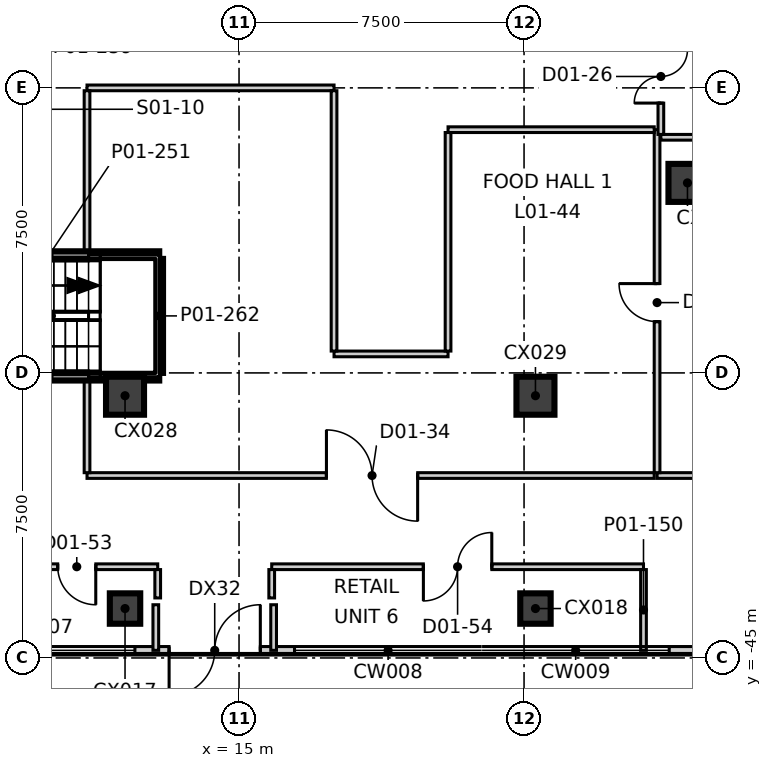
"""IFC4 building model, lengths in metres.
Left out: names, types, materials, properties, quantities, classifications, styles, units other than length and angle.
Written with IfcOpenShell. Run it as: python <this file> out.ifc"""

import sys

from ifc_helpers import new_model, si_unit, direction, frame, frame_2d, origin, origin_2d, place, context, subcontext, project, spatial, rectangle, extrude, element, fill, save


model = new_model("IFC4")
c1 = context("Model", 3, precision=1e-05, world=origin(), true_north=direction((0.0, 1.0)))
c2 = subcontext(c1, "Body", "Model", "MODEL_VIEW")
j1 = project(units=[si_unit("LENGTHUNIT", "METRE"), si_unit("PLANEANGLEUNIT", "RADIAN")], contexts=[c1])
p1 = place(None, origin())
s1 = spatial("IfcSite", under=j1, at=p1, CompositionType="ELEMENT")
p2 = place(p1, origin())
s2 = spatial("IfcBuilding", under=s1, at=p2, CompositionType="ELEMENT")
p3 = place(p2, frame((0.0, 0.0, 8.5)))
s3 = spatial("IfcBuildingStorey", under=s2, at=p3, CompositionType="ELEMENT", Elevation=8.5)
for number, where, z_axis, x_axis in (
    (1, (12.0, -43.7, -0.4), (0.0, 0.0, 1.0), (1.0, 0.0, 0.0)),
    (2, (22.8, -43.7, -0.4), (0.0, 0.0, 1.0), (1.0, 0.0, 0.0)),
):
    element("IfcColumn", number, at=place(p3, frame(where, z_axis=z_axis, x_axis=x_axis)), inside=s3, PredefinedType="COLUMN", context=c2, shape_type="SweptSolid", body=[
        extrude(rectangle(XDim=0.8, YDim=0.8, at=origin_2d()), origin(), (0.0, 0.0, 1.0), 6.0),
    ])
for number, where, z_axis, x_axis in (
    (3, (12.0, -38.1, -0.4), (0.0, 0.0, 1.0), (1.0, 0.0, 0.0)),
    (4, (22.8, -38.1, -0.4), (0.0, 0.0, 1.0), (1.0, 0.0, 0.0)),
    (5, (26.8, -32.5, -0.4), (0.0, 0.0, 1.0), (1.0, 0.0, 0.0)),
):
    element("IfcColumn", number, at=place(p3, frame(where, z_axis=z_axis, x_axis=x_axis)), inside=s3, PredefinedType="COLUMN", context=c2, shape_type="SweptSolid", body=[
        extrude(rectangle(XDim=1.0, YDim=1.0, at=origin_2d()), origin(), (0.0, 0.0, 1.0), 6.0),
    ])
p4 = place(p3, frame((12.26, -44.8, 0.0), z_axis=(0.0, 0.0, 1.0), x_axis=(1.0, 0.0, 0.0)))
e6 = element("IfcWall", 6, at=p4, inside=s3, PredefinedType="ELEMENTEDWALL", context=c2, shape_type="SweptSolid", body=[
    extrude(rectangle(XDim=4.2, YDim=0.2, at=frame_2d((2.1, 0.0))), origin(), (0.0, 0.0, 1.0), 5.6),
])
p5 = place(p4, frame((0.9, 0.0, 0.0)))
e7 = element("IfcOpeningElement", 7, at=p5, cuts=e6, PredefinedType="OPENING", context=c2, shape_type="SweptSolid", body=[
    extrude(rectangle(XDim=2.4, YDim=2.4, at=frame_2d((1.2, 1.2))), frame((0.0, 0.11, 0.0), z_axis=(0.0, -1.0, 0.0), x_axis=(1.0, 0.0, 0.0)), (0.0, 0.0, 1.0), 0.22),
])
p6 = place(p3, frame((26.32, -44.8, 0.0), z_axis=(0.0, 0.0, 1.0), x_axis=(1.0, 0.0, 0.0)))
e8 = element("IfcWall", 8, at=p6, inside=s3, PredefinedType="ELEMENTEDWALL", context=c2, shape_type="SweptSolid", body=[
    extrude(rectangle(XDim=4.2, YDim=0.2, at=frame_2d((2.1, 0.0))), origin(), (0.0, 0.0, 1.0), 5.6),
])
p7 = place(p6, frame((0.9, 0.0, 0.0)))
e9 = element("IfcOpeningElement", 9, at=p7, cuts=e8, PredefinedType="OPENING", context=c2, shape_type="SweptSolid", body=[
    extrude(rectangle(XDim=2.4, YDim=2.4, at=frame_2d((1.2, 1.2))), frame((0.0, 0.11, 0.0), z_axis=(0.0, -1.0, 0.0), x_axis=(1.0, 0.0, 0.0)), (0.0, 0.0, 1.0), 0.22),
])
p8 = place(p3, frame((26.1, -31.3, 0.0), z_axis=(0.0, 0.0, 1.0), x_axis=(1.0, 0.0, 0.0)))
e10 = element("IfcWall", 10, at=p8, inside=s3, PredefinedType="PARTITIONING", context=c2, shape_type="SweptSolid", body=[
    extrude(rectangle(XDim=1.9, YDim=0.15, at=frame_2d((0.95, 0.0))), origin(), (0.0, 0.0, 1.0), 5.6),
])
p9 = place(p3, frame((26.0, -40.2, 0.0), z_axis=(0.0, 0.0, 1.0), x_axis=(1.0, 0.0, 0.0)))
e11 = element("IfcWall", 11, at=p9, inside=s3, PredefinedType="PARTITIONING", context=c2, shape_type="SweptSolid", body=[
    extrude(rectangle(XDim=5.225, YDim=0.15, at=frame_2d((2.613, 0.0))), origin(), (0.0, 0.0, 1.0), 5.6),
])
p10 = place(p3, frame((26.0, -40.125, 0.0), z_axis=(0.0, 0.0, 1.0), x_axis=(0.0, 1.0, 0.0)))
e12 = element("IfcWall", 12, at=p10, inside=s3, PredefinedType="PARTITIONING", context=c2, shape_type="SweptSolid", body=[
    extrude(rectangle(XDim=9.025, YDim=0.15, at=frame_2d((4.512, 0.0))), origin(), (0.0, 0.0, 1.0), 5.6),
])
p11 = place(p10, frame((3.975, 0.0, 0.0)))
e13 = element("IfcOpeningElement", 13, at=p11, cuts=e12, PredefinedType="OPENING", context=c2, shape_type="SweptSolid", body=[
    extrude(rectangle(XDim=1.0, YDim=2.1, at=frame_2d((0.5, 1.05))), frame((0.0, 0.085, 0.0), z_axis=(0.0, -1.0, 0.0), x_axis=(1.0, 0.0, 0.0)), (0.0, 0.0, 1.0), 0.17),
])
p12 = place(p3, frame((26.1, -31.225, 0.0), z_axis=(0.0, 0.0, 1.0), x_axis=(0.0, 1.0, 0.0)))
e14 = element("IfcWall", 14, at=p12, inside=s3, PredefinedType="PARTITIONING", context=c2, shape_type="SweptSolid", body=[
    extrude(rectangle(XDim=3.05, YDim=0.15, at=frame_2d((1.525, 0.0))), origin(), (0.0, 0.0, 1.0), 5.6),
])
p13 = place(p12, frame((0.825, 0.0, 0.0)))
e15 = element("IfcOpeningElement", 15, at=p13, cuts=e14, PredefinedType="OPENING", context=c2, shape_type="SweptSolid", body=[
    extrude(rectangle(XDim=1.4, YDim=2.1, at=frame_2d((0.7, 1.05))), frame((0.0, 0.085, 0.0), z_axis=(0.0, -1.0, 0.0), x_axis=(1.0, 0.0, 0.0)), (0.0, 0.0, 1.0), 0.17),
])
p14 = place(p3, frame((8.6, -42.6, 0.0), z_axis=(0.0, 0.0, 1.0), x_axis=(1.0, 0.0, 0.0)))
e16 = element("IfcWall", 16, at=p14, inside=s3, PredefinedType="PARTITIONING", context=c2, shape_type="SweptSolid", body=[
    extrude(rectangle(XDim=4.26, YDim=0.15, at=frame_2d((2.13, 0.0))), origin(), (0.0, 0.0, 1.0), 5.6),
])
p15 = place(p14, frame((1.63, 0.0, 0.0)))
e17 = element("IfcOpeningElement", 17, at=p15, cuts=e16, PredefinedType="OPENING", context=c2, shape_type="SweptSolid", body=[
    extrude(rectangle(XDim=1.0, YDim=2.1, at=frame_2d((0.5, 1.05))), frame((0.0, 0.085, 0.0), z_axis=(0.0, -1.0, 0.0), x_axis=(1.0, 0.0, 0.0)), (0.0, 0.0, 1.0), 0.17),
])
p16 = place(p3, frame((15.86, -42.6, 0.0), z_axis=(0.0, 0.0, 1.0), x_axis=(1.0, 0.0, 0.0)))
e18 = element("IfcWall", 18, at=p16, inside=s3, PredefinedType="PARTITIONING", context=c2, shape_type="SweptSolid", body=[
    extrude(rectangle(XDim=9.783, YDim=0.15, at=frame_2d((4.892, 0.0))), origin(), (0.0, 0.0, 1.0), 5.6),
])
p17 = place(p16, frame((3.991, 0.0, 0.0)))
e19 = element("IfcOpeningElement", 19, at=p17, cuts=e18, PredefinedType="OPENING", context=c2, shape_type="SweptSolid", body=[
    extrude(rectangle(XDim=1.8, YDim=2.1, at=frame_2d((0.9, 1.05))), frame((0.0, 0.085, 0.0), z_axis=(0.0, -1.0, 0.0), x_axis=(1.0, 0.0, 0.0)), (0.0, 0.0, 1.0), 0.17),
])
p18 = place(p3, frame((11.0, -40.2, 0.0), z_axis=(0.0, 0.0, 1.0), x_axis=(1.0, 0.0, 0.0)))
e20 = element("IfcWall", 20, at=p18, inside=s3, PredefinedType="PARTITIONING", context=c2, shape_type="SweptSolid", body=[
    extrude(rectangle(XDim=14.925, YDim=0.15, at=frame_2d((7.462, 0.0))), origin(), (0.0, 0.0, 1.0), 5.6),
])
p19 = place(p18, frame((6.3, 0.0, 0.0)))
e21 = element("IfcOpeningElement", 21, at=p19, cuts=e20, PredefinedType="OPENING", context=c2, shape_type="SweptSolid", body=[
    extrude(rectangle(XDim=2.4, YDim=2.1, at=frame_2d((1.2, 1.05))), frame((0.0, 0.085, 0.0), z_axis=(0.0, -1.0, 0.0), x_axis=(1.0, 0.0, 0.0)), (0.0, 0.0, 1.0), 0.17),
])
p20 = place(p3, frame((20.5, -31.1, 0.0), z_axis=(0.0, 0.0, 1.0), x_axis=(1.0, 0.0, 0.0)))
e22 = element("IfcWall", 22, at=p20, inside=s3, PredefinedType="PARTITIONING", context=c2, shape_type="SweptSolid", body=[
    extrude(rectangle(XDim=5.425, YDim=0.15, at=frame_2d((2.712, 0.0))), origin(), (0.0, 0.0, 1.0), 5.6),
])
p21 = place(p3, frame((17.5, -37.0, 0.0), z_axis=(0.0, 0.0, 1.0), x_axis=(1.0, 0.0, 0.0)))
e23 = element("IfcWall", 23, at=p21, inside=s3, PredefinedType="PARTITIONING", context=c2, shape_type="SweptSolid", body=[
    extrude(rectangle(XDim=3.0, YDim=0.15, at=frame_2d((1.5, 0.0))), origin(), (0.0, 0.0, 1.0), 5.6),
])
p22 = place(p3, frame((11.0, -30.0, 0.0), z_axis=(0.0, 0.0, 1.0), x_axis=(1.0, 0.0, 0.0)))
e24 = element("IfcWall", 24, at=p22, inside=s3, PredefinedType="PARTITIONING", context=c2, shape_type="SweptSolid", body=[
    extrude(rectangle(XDim=6.5, YDim=0.15, at=frame_2d((3.25, 0.0))), origin(), (0.0, 0.0, 1.0), 5.6),
])
p23 = place(p3, frame((12.86, -43.421, 0.0), z_axis=(0.0, 0.0, 1.0), x_axis=(0.0, 1.0, 0.0)))
e25 = element("IfcWall", 25, at=p23, inside=s3, PredefinedType="PARTITIONING", context=c2, shape_type="SweptSolid", body=[
    extrude(rectangle(XDim=0.746, YDim=0.15, at=frame_2d((0.373, 0.0))), origin(), (0.0, 0.0, 1.0), 5.6),
])
p24 = place(p3, frame((12.81, -44.8, 0.0), z_axis=(0.0, 0.0, 1.0), x_axis=(0.0, 1.0, 0.0)))
e26 = element("IfcWall", 26, at=p24, inside=s3, PredefinedType="PARTITIONING", context=c2, shape_type="SweptSolid", body=[
    extrude(rectangle(XDim=1.2, YDim=0.15, at=frame_2d((0.6, 0.0))), origin(), (0.0, 0.0, 1.0), 5.6),
])
p25 = place(p3, frame((11.0, -40.125, 0.0), z_axis=(0.0, 0.0, 1.0), x_axis=(0.0, 1.0, 0.0)))
e27 = element("IfcWall", 27, at=p25, inside=s3, PredefinedType="PARTITIONING", context=c2, shape_type="SweptSolid", body=[
    extrude(rectangle(XDim=2.425, YDim=0.15, at=frame_2d((1.212, 0.0))), origin(), (0.0, 0.0, 1.0), 5.6),
])
p26 = place(p3, frame((11.0, -34.3, 0.0), z_axis=(0.0, 0.0, 1.0), x_axis=(0.0, 1.0, 0.0)))
e28 = element("IfcWall", 28, at=p26, inside=s3, PredefinedType="PARTITIONING", context=c2, shape_type="SweptSolid", body=[
    extrude(rectangle(XDim=4.225, YDim=0.15, at=frame_2d((2.113, 0.0))), origin(), (0.0, 0.0, 1.0), 5.6),
])
p27 = place(p3, frame((17.5, -36.925, 0.0), z_axis=(0.0, 0.0, 1.0), x_axis=(0.0, 1.0, 0.0)))
e29 = element("IfcWall", 29, at=p27, inside=s3, PredefinedType="PARTITIONING", context=c2, shape_type="SweptSolid", body=[
    extrude(rectangle(XDim=6.85, YDim=0.15, at=frame_2d((3.425, 0.0))), origin(), (0.0, 0.0, 1.0), 5.6),
])
p28 = place(p3, frame((20.5, -36.925, 0.0), z_axis=(0.0, 0.0, 1.0), x_axis=(0.0, 1.0, 0.0)))
e30 = element("IfcWall", 30, at=p28, inside=s3, PredefinedType="PARTITIONING", context=c2, shape_type="SweptSolid", body=[
    extrude(rectangle(XDim=5.75, YDim=0.15, at=frame_2d((2.875, 0.0))), origin(), (0.0, 0.0, 1.0), 5.6),
])
p29 = place(p3, frame((15.91, -44.8, 0.0), z_axis=(0.0, 0.0, 1.0), x_axis=(0.0, 1.0, 0.0)))
e31 = element("IfcWall", 31, at=p29, inside=s3, PredefinedType="PARTITIONING", context=c2, shape_type="SweptSolid", body=[
    extrude(rectangle(XDim=1.2, YDim=0.15, at=frame_2d((0.6, 0.0))), origin(), (0.0, 0.0, 1.0), 5.6),
])
p30 = place(p3, frame((15.86, -43.421, 0.0), z_axis=(0.0, 0.0, 1.0), x_axis=(0.0, 1.0, 0.0)))
e32 = element("IfcWall", 32, at=p30, inside=s3, PredefinedType="PARTITIONING", context=c2, shape_type="SweptSolid", body=[
    extrude(rectangle(XDim=0.746, YDim=0.15, at=frame_2d((0.373, 0.0))), origin(), (0.0, 0.0, 1.0), 5.6),
])
p31 = place(p3, frame((25.643, -44.8, 0.0), z_axis=(0.0, 0.0, 1.0), x_axis=(0.0, 1.0, 0.0)))
e33 = element("IfcWall", 33, at=p31, inside=s3, PredefinedType="PARTITIONING", context=c2, shape_type="SweptSolid", body=[
    extrude(rectangle(XDim=2.125, YDim=0.15, at=frame_2d((1.062, 0.0))), origin(), (0.0, 0.0, 1.0), 5.6),
])
for number, where, z_axis, x_axis in (
    (34, (7.1, -37.6, 0.0), (0.0, 0.0, 1.0), (1.0, 0.0, 0.0)),
    (35, (7.1, -34.4, 0.0), (0.0, 0.0, 1.0), (1.0, 0.0, 0.0)),
):
    element("IfcWall", number, at=place(p3, frame(where, z_axis=z_axis, x_axis=x_axis)), inside=s3, PredefinedType="SOLIDWALL", context=c2, shape_type="SweptSolid", body=[
        extrude(rectangle(XDim=5.8, YDim=0.2, at=frame_2d((2.9, 0.0))), origin(), (0.0, 0.0, 1.0), 5.6),
    ])
p32 = place(p3, frame((12.9, -37.5, 0.0), z_axis=(0.0, 0.0, 1.0), x_axis=(0.0, 1.0, 0.0)))
e36 = element("IfcWall", 36, at=p32, inside=s3, PredefinedType="SOLIDWALL", context=c2, shape_type="SweptSolid", body=[
    extrude(rectangle(XDim=3.0, YDim=0.2, at=frame_2d((1.5, 0.0))), origin(), (0.0, 0.0, 1.0), 5.6),
])
p33 = place(p5, frame((2.4, 0.0, 0.0), z_axis=(0.0, 0.0, 1.0), x_axis=(-1.0, 0.0, 0.0)))
e37 = element("IfcDoor", 37, at=p33, inside=s3, OperationType="DOUBLE_DOOR_SINGLE_SWING", PredefinedType="DOOR", context=c2, shape_type="SweptSolid", body=[
    extrude(rectangle(XDim=2.4, YDim=2.4, at=frame_2d((1.2, 1.2))), frame((0.0, 0.025, 0.0), z_axis=(0.0, -1.0, 0.0), x_axis=(1.0, 0.0, 0.0)), (0.0, 0.0, 1.0), 0.05),
])
fill(e7, e37)
p34 = place(p13, origin())
e38 = element("IfcDoor", 38, at=p34, inside=s3, OperationType="DOUBLE_DOOR_SINGLE_SWING", PredefinedType="DOOR", context=c2, shape_type="SweptSolid", body=[
    extrude(rectangle(XDim=1.4, YDim=2.1, at=frame_2d((0.7, 1.05))), frame((0.0, 0.025, 0.0), z_axis=(0.0, -1.0, 0.0), x_axis=(1.0, 0.0, 0.0)), (0.0, 0.0, 1.0), 0.05),
])
fill(e15, e38)
p35 = place(p19, origin())
e39 = element("IfcDoor", 39, at=p35, inside=s3, OperationType="DOUBLE_DOOR_SINGLE_SWING", PredefinedType="DOOR", context=c2, shape_type="SweptSolid", body=[
    extrude(rectangle(XDim=2.4, YDim=2.1, at=frame_2d((1.2, 1.05))), frame((0.0, 0.025, 0.0), z_axis=(0.0, -1.0, 0.0), x_axis=(1.0, 0.0, 0.0)), (0.0, 0.0, 1.0), 0.05),
])
fill(e21, e39)
p36 = place(p11, origin())
e40 = element("IfcDoor", 40, at=p36, inside=s3, OperationType="SINGLE_SWING_LEFT", PredefinedType="DOOR", context=c2, shape_type="SweptSolid", body=[
    extrude(rectangle(XDim=1.0, YDim=2.1, at=frame_2d((0.5, 1.05))), frame((0.0, 0.025, 0.0), z_axis=(0.0, -1.0, 0.0), x_axis=(1.0, 0.0, 0.0)), (0.0, 0.0, 1.0), 0.05),
])
fill(e13, e40)
p37 = place(p15, origin())
e41 = element("IfcDoor", 41, at=p37, inside=s3, OperationType="SINGLE_SWING_RIGHT", PredefinedType="DOOR", context=c2, shape_type="SweptSolid", body=[
    extrude(rectangle(XDim=1.0, YDim=2.1, at=frame_2d((0.5, 1.05))), frame((0.0, 0.025, 0.0), z_axis=(0.0, -1.0, 0.0), x_axis=(1.0, 0.0, 0.0)), (0.0, 0.0, 1.0), 0.05),
])
fill(e17, e41)
p38 = place(p17, origin())
e42 = element("IfcDoor", 42, at=p38, inside=s3, OperationType="DOUBLE_DOOR_SINGLE_SWING", PredefinedType="DOOR", context=c2, shape_type="SweptSolid", body=[
    extrude(rectangle(XDim=1.8, YDim=2.1, at=frame_2d((0.9, 1.05))), frame((0.0, 0.025, 0.0), z_axis=(0.0, -1.0, 0.0), x_axis=(1.0, 0.0, 0.0)), (0.0, 0.0, 1.0), 0.05),
])
fill(e19, e42)
save(model, sys.argv[1])
